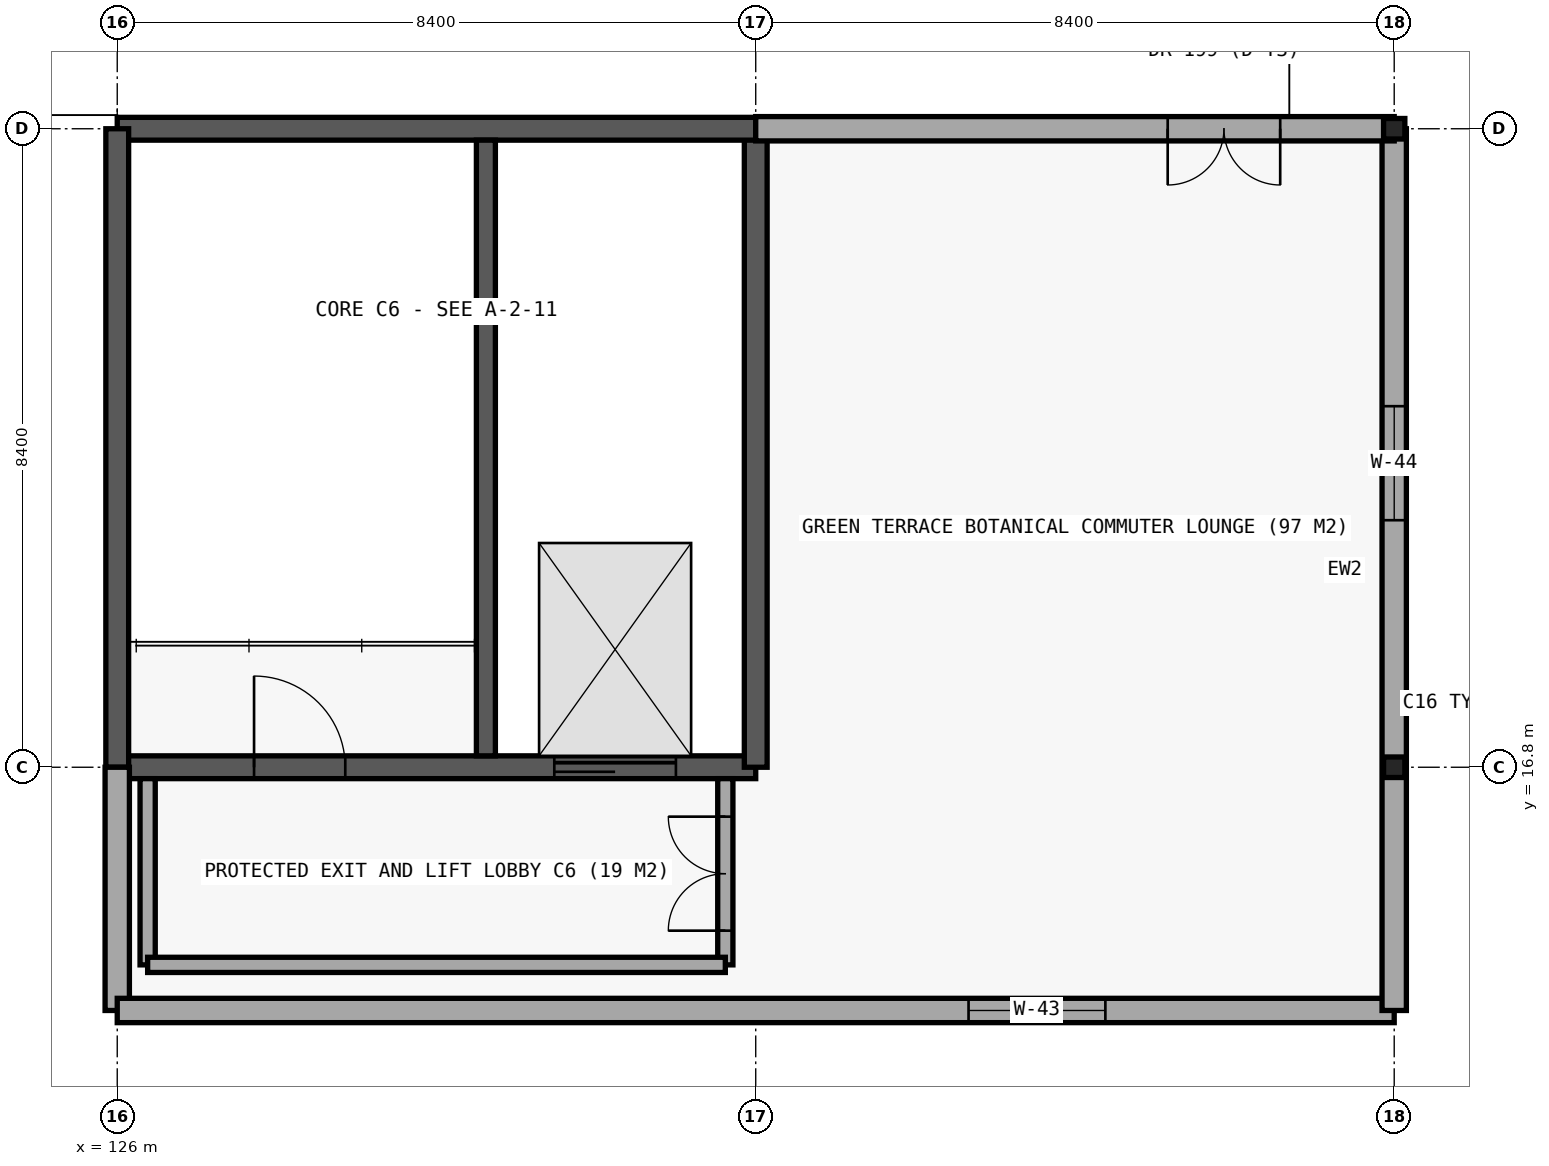
"""IFC4 building model, lengths in metres.
Left out: names, types, materials, properties, quantities, classifications, styles, units other than length and angle.
Written with IfcOpenShell. Run it as: python <this file> out.ifc"""

import sys

from ifc_helpers import new_model, si_unit, direction, frame, frame_2d, origin, origin_2d, place, context, subcontext, project, spatial, rectangle, i_section, extrude, element, fill, save


model = new_model("IFC4")
c1 = context("Model", 3, precision=1e-05, world=origin(), true_north=direction((0.0, 1.0)))
c2 = subcontext(c1, "Body", "Model", "MODEL_VIEW")
j1 = project(units=[si_unit("LENGTHUNIT", "METRE"), si_unit("PLANEANGLEUNIT", "RADIAN")], contexts=[c1])
p1 = place(None, origin())
s1 = spatial("IfcSite", under=j1, at=p1, CompositionType="ELEMENT")
p2 = place(p1, origin())
s2 = spatial("IfcBuilding", under=s1, at=p2, CompositionType="ELEMENT")
p3 = place(p2, frame((0.0, 0.0, 13.2)))
s3 = spatial("IfcBuildingStorey", under=s2, at=p3, CompositionType="ELEMENT", Elevation=13.2)
p4 = place(p3, frame((126.0, 16.8, 0.0), z_axis=(0.0, 0.0, 1.0), x_axis=(1.0, 0.0, 0.0)))
e1 = element("IfcWall", 1, at=p4, inside=s3, PredefinedType="SHEAR", context=c2, shape_type="SweptSolid", body=[
    extrude(rectangle(XDim=8.4, YDim=0.3, at=frame_2d((4.2, 0.0))), origin(), (0.0, 0.0, 1.0), 4.2),
])
p5 = place(p4, frame((1.8, 0.0, 0.0)))
e2 = element("IfcOpeningElement", 2, at=p5, cuts=e1, PredefinedType="OPENING", context=c2, shape_type="SweptSolid", body=[
    extrude(rectangle(XDim=1.2, YDim=2.2, at=frame_2d((0.6, 1.1))), frame((0.0, 0.16, 0.0), z_axis=(0.0, -1.0, 0.0), x_axis=(1.0, 0.0, 0.0)), (0.0, 0.0, 1.0), 0.32),
])
p6 = place(p4, frame((5.75, 0.0, 0.0)))
e3 = element("IfcOpeningElement", 3, at=p6, cuts=e1, PredefinedType="OPENING", context=c2, shape_type="SweptSolid", body=[
    extrude(rectangle(XDim=1.6, YDim=2.4, at=frame_2d((0.8, 1.2))), frame((0.0, 0.16, 0.0), z_axis=(0.0, -1.0, 0.0), x_axis=(1.0, 0.0, 0.0)), (0.0, 0.0, 1.0), 0.32),
])
for number, where, z_axis, x_axis in (
    (4, (134.4, 16.8, 0.0), (0.0, 0.0, 1.0), (0.0, 1.0, 0.0)),
    (5, (134.4, 25.2, 0.0), (0.0, 0.0, 1.0), (-1.0, 0.0, 0.0)),
    (6, (126.0, 25.2, 0.0), (0.0, 0.0, 1.0), (0.0, -1.0, 0.0)),
):
    element("IfcWall", number, at=place(p3, frame(where, z_axis=z_axis, x_axis=x_axis)), inside=s3, PredefinedType="SHEAR", context=c2, shape_type="SweptSolid", body=[
        extrude(rectangle(XDim=8.4, YDim=0.3, at=frame_2d((4.2, 0.0))), origin(), (0.0, 0.0, 1.0), 4.2),
    ])
p7 = place(p3, frame((130.85, 16.95, 0.0), z_axis=(0.0, 0.0, 1.0), x_axis=(0.0, 1.0, 0.0)))
e7 = element("IfcWall", 7, at=p7, inside=s3, PredefinedType="SHEAR", context=c2, shape_type="SweptSolid", body=[
    extrude(rectangle(XDim=8.1, YDim=0.25, at=frame_2d((4.05, 0.0))), origin(), (0.0, 0.0, 1.0), 4.2),
])
for number, where, z_axis, x_axis in (
    (8, (142.8, 16.8, 0.0), (0.0, 0.0, 1.0), (1.0, 0.0, 0.0)),
    (9, (142.8, 25.2, 0.0), (0.0, 0.0, 1.0), (1.0, 0.0, 0.0)),
):
    element("IfcColumn", number, at=place(p3, frame(where, z_axis=z_axis, x_axis=x_axis)), inside=s3, PredefinedType="COLUMN", context=c2, shape_type="SweptSolid", body=[
        extrude(i_section(OverallWidth=0.28, OverallDepth=0.27, WebThickness=0.008, FlangeThickness=0.013, FilletRadius=0.024, at=origin_2d()), origin(), (0.0, 0.0, 1.0), 4.03),
    ])
p8 = place(p3, frame((126.0, 16.8, 0.0), z_axis=(0.0, 0.0, 1.0), x_axis=(0.0, -1.0, 0.0)))
e10 = element("IfcWall", 10, at=p8, inside=s3, PredefinedType="STANDARD", context=c2, shape_type="SweptSolid", body=[
    extrude(rectangle(XDim=3.2, YDim=0.32, at=frame_2d((1.6, 0.0))), origin(), (0.0, 0.0, 1.0), 3.45),
])
p9 = place(p3, frame((126.0, 13.6, 0.0), z_axis=(0.0, 0.0, 1.0), x_axis=(1.0, 0.0, 0.0)))
e11 = element("IfcWall", 11, at=p9, inside=s3, PredefinedType="STANDARD", context=c2, shape_type="SweptSolid", body=[
    extrude(rectangle(XDim=16.8, YDim=0.32, at=frame_2d((8.4, 0.0))), origin(), (0.0, 0.0, 1.0), 3.45),
])
p10 = place(p9, frame((11.2, 0.0, 0.9)))
e12 = element("IfcOpeningElement", 12, at=p10, cuts=e11, PredefinedType="OPENING", context=c2, shape_type="SweptSolid", body=[
    extrude(rectangle(XDim=1.8, YDim=2.1, at=frame_2d((0.9, 1.05))), frame((0.0, 0.17, 0.0), z_axis=(0.0, -1.0, 0.0), x_axis=(1.0, 0.0, 0.0)), (0.0, 0.0, 1.0), 0.34),
])
p11 = place(p3, frame((142.8, 13.6, 0.0), z_axis=(0.0, 0.0, 1.0), x_axis=(0.0, 1.0, 0.0)))
e13 = element("IfcWall", 13, at=p11, inside=s3, PredefinedType="STANDARD", context=c2, shape_type="SweptSolid", body=[
    extrude(rectangle(XDim=11.6, YDim=0.32, at=frame_2d((5.8, 0.0))), origin(), (0.0, 0.0, 1.0), 3.45),
])
p12 = place(p11, frame((6.45, 0.0, 0.95)))
e14 = element("IfcOpeningElement", 14, at=p12, cuts=e13, PredefinedType="OPENING", context=c2, shape_type="SweptSolid", body=[
    extrude(rectangle(XDim=1.5, YDim=2.0, at=frame_2d((0.75, 1.0))), frame((0.0, 0.17, 0.0), z_axis=(0.0, -1.0, 0.0), x_axis=(1.0, 0.0, 0.0)), (0.0, 0.0, 1.0), 0.34),
])
p13 = place(p3, frame((142.8, 25.2, 0.0), z_axis=(0.0, 0.0, 1.0), x_axis=(-1.0, 0.0, 0.0)))
e15 = element("IfcWall", 15, at=p13, inside=s3, PredefinedType="STANDARD", context=c2, shape_type="SweptSolid", body=[
    extrude(rectangle(XDim=8.4, YDim=0.32, at=frame_2d((4.2, 0.0))), origin(), (0.0, 0.0, 1.0), 3.45),
])
p14 = place(p13, frame((1.5, 0.0, 0.0)))
e16 = element("IfcOpeningElement", 16, at=p14, cuts=e15, PredefinedType="OPENING", context=c2, shape_type="SweptSolid", body=[
    extrude(rectangle(XDim=1.48, YDim=2.32, at=frame_2d((0.74, 1.16))), frame((0.0, 0.17, 0.0), z_axis=(0.0, -1.0, 0.0), x_axis=(1.0, 0.0, 0.0)), (0.0, 0.0, 1.0), 0.34),
])
p15 = place(p3, frame((126.4, 14.2, 0.0), z_axis=(0.0, 0.0, 1.0), x_axis=(0.0, 1.0, 0.0)))
e17 = element("IfcWall", 17, at=p15, inside=s3, PredefinedType="PARTITIONING", context=c2, shape_type="SweptSolid", body=[
    extrude(rectangle(XDim=2.45, YDim=0.2, at=frame_2d((1.225, 0.0))), origin(), (0.0, 0.0, 1.0), 3.52),
])
p16 = place(p3, frame((134.0, 14.2, 0.0), z_axis=(0.0, 0.0, 1.0), x_axis=(0.0, 1.0, 0.0)))
e18 = element("IfcWall", 18, at=p16, inside=s3, PredefinedType="PARTITIONING", context=c2, shape_type="SweptSolid", body=[
    extrude(rectangle(XDim=2.45, YDim=0.2, at=frame_2d((1.225, 0.0))), origin(), (0.0, 0.0, 1.0), 3.52),
])
p17 = place(p16, frame((0.45, 0.0, 0.0)))
e19 = element("IfcOpeningElement", 19, at=p17, cuts=e18, PredefinedType="OPENING", context=c2, shape_type="SweptSolid", body=[
    extrude(rectangle(XDim=1.5, YDim=2.2, at=frame_2d((0.75, 1.1))), frame((0.0, 0.11, 0.0), z_axis=(0.0, -1.0, 0.0), x_axis=(1.0, 0.0, 0.0)), (0.0, 0.0, 1.0), 0.22),
])
p18 = place(p3, frame((126.4, 14.2, 0.0), z_axis=(0.0, 0.0, 1.0), x_axis=(1.0, 0.0, 0.0)))
e20 = element("IfcWall", 20, at=p18, inside=s3, PredefinedType="PARTITIONING", context=c2, shape_type="SweptSolid", body=[
    extrude(rectangle(XDim=7.6, YDim=0.2, at=frame_2d((3.8, 0.0))), origin(), (0.0, 0.0, 1.0), 3.52),
])
p19 = place(p10, origin())
e21 = element("IfcWindow", 21, at=p19, inside=s3, PartitioningType="SINGLE_PANEL", PredefinedType="WINDOW", context=c2, shape_type="SweptSolid", body=[
    extrude(rectangle(XDim=1.8, YDim=2.1, at=frame_2d((0.9, 1.05))), frame((0.0, 0.03, 0.0), z_axis=(0.0, -1.0, 0.0), x_axis=(1.0, 0.0, 0.0)), (0.0, 0.0, 1.0), 0.06),
])
fill(e12, e21)
p20 = place(p12, origin())
e22 = element("IfcWindow", 22, at=p20, inside=s3, PartitioningType="SINGLE_PANEL", PredefinedType="WINDOW", context=c2, shape_type="SweptSolid", body=[
    extrude(rectangle(XDim=1.5, YDim=2.0, at=frame_2d((0.75, 1.0))), frame((0.0, 0.03, 0.0), z_axis=(0.0, -1.0, 0.0), x_axis=(1.0, 0.0, 0.0)), (0.0, 0.0, 1.0), 0.06),
])
fill(e14, e22)
p21 = place(p14, origin())
e23 = element("IfcDoor", 23, at=p21, inside=s3, OperationType="DOUBLE_DOOR_SINGLE_SWING", PredefinedType="DOOR", context=c2, shape_type="SweptSolid", body=[
    extrude(rectangle(XDim=1.48, YDim=2.32, at=frame_2d((0.74, 1.16))), frame((0.0, 0.025, 0.0), z_axis=(0.0, -1.0, 0.0), x_axis=(1.0, 0.0, 0.0)), (0.0, 0.0, 1.0), 0.05),
])
fill(e16, e23)
p22 = place(p5, origin())
e24 = element("IfcDoor", 24, at=p22, inside=s3, OperationType="SINGLE_SWING_LEFT", PredefinedType="DOOR", context=c2, shape_type="SweptSolid", body=[
    extrude(rectangle(XDim=1.2, YDim=2.2, at=frame_2d((0.6, 1.1))), frame((0.0, 0.025, 0.0), z_axis=(0.0, -1.0, 0.0), x_axis=(1.0, 0.0, 0.0)), (0.0, 0.0, 1.0), 0.05),
])
fill(e2, e24)
p23 = place(p6, origin())
e25 = element("IfcDoor", 25, at=p23, inside=s3, OperationType="SLIDING_TO_LEFT", PredefinedType="DOOR", context=c2, shape_type="SweptSolid", body=[
    extrude(rectangle(XDim=1.6, YDim=2.4, at=frame_2d((0.8, 1.2))), frame((0.0, 0.025, 0.0), z_axis=(0.0, -1.0, 0.0), x_axis=(1.0, 0.0, 0.0)), (0.0, 0.0, 1.0), 0.05),
])
fill(e3, e25)
p24 = place(p17, origin())
e26 = element("IfcDoor", 26, at=p24, inside=s3, OperationType="DOUBLE_DOOR_SINGLE_SWING", PredefinedType="DOOR", context=c2, shape_type="SweptSolid", body=[
    extrude(rectangle(XDim=1.5, YDim=2.2, at=frame_2d((0.75, 1.1))), frame((0.0, 0.025, 0.0), z_axis=(0.0, -1.0, 0.0), x_axis=(1.0, 0.0, 0.0)), (0.0, 0.0, 1.0), 0.05),
])
fill(e19, e26)
save(model, sys.argv[1])
